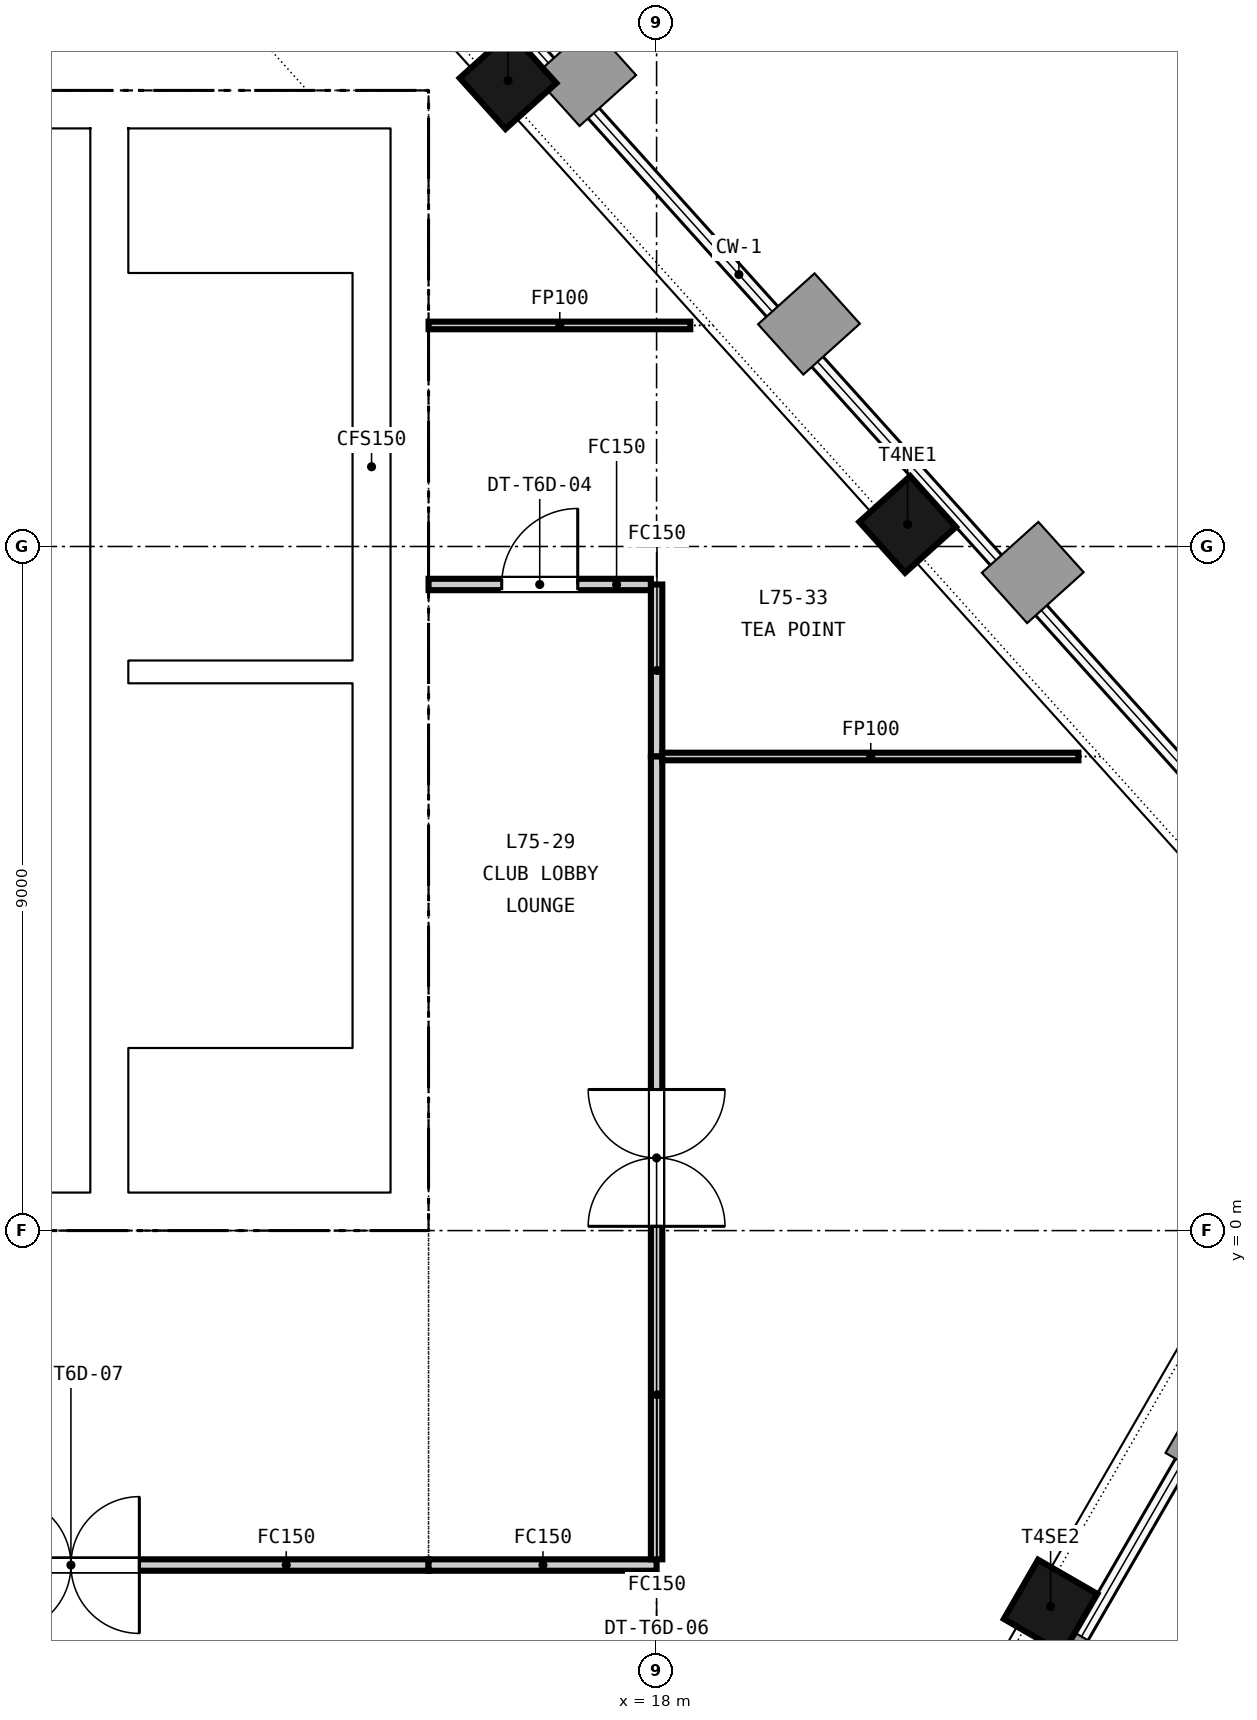
"""IFC4 building model, lengths in metres.
Left out: names, types, materials, properties, quantities, classifications, styles, units other than length and angle.
Written with IfcOpenShell. Run it as: python <this file> out.ifc"""

import sys

from ifc_helpers import new_model, si_unit, direction, frame, frame_2d, origin, origin_2d, place, context, subcontext, project, spatial, rectangle, extrude, element, fill, save


model = new_model("IFC4")
c1 = context("Model", 3, precision=1e-05, world=origin(), true_north=direction((0.0, 1.0)))
c2 = subcontext(c1, "Body", "Model", "MODEL_VIEW")
j1 = project(units=[si_unit("LENGTHUNIT", "METRE"), si_unit("PLANEANGLEUNIT", "RADIAN")], contexts=[c1])
p1 = place(None, origin())
s1 = spatial("IfcSite", under=j1, at=p1, CompositionType="ELEMENT")
p2 = place(p1, origin())
s2 = spatial("IfcBuilding", under=s1, at=p2, CompositionType="ELEMENT")
p3 = place(p2, frame((0.0, 0.0, 293.8)))
s3 = spatial("IfcBuildingStorey", under=s2, at=p3, CompositionType="ELEMENT", Elevation=293.8)
p4 = place(p3, frame((-15.0, 0.25, -0.15), z_axis=(0.0, 0.0, 1.0), x_axis=(1.0, 0.0, 0.0)))
e1 = element("IfcWall", 1, at=p4, inside=s3, PredefinedType="SOLIDWALL", context=c2, shape_type="SweptSolid", body=[
    extrude(rectangle(XDim=30.0, YDim=0.5, at=frame_2d((15.0, 0.0))), origin(), (0.0, 0.0, 1.0), 3.65),
])
p5 = place(p4, frame((5.8, 0.0, 0.15)))
e2 = element("IfcOpeningElement", 2, at=p5, cuts=e1, PredefinedType="OPENING", context=c2, shape_type="SweptSolid", body=[
    extrude(rectangle(XDim=2.4, YDim=2.4, at=frame_2d((1.2, 1.2))), frame((0.0, 0.26, 0.0), z_axis=(0.0, -1.0, 0.0), x_axis=(1.0, 0.0, 0.0)), (0.0, 0.0, 1.0), 0.52),
])
p6 = place(p4, frame((13.8, 0.0, 0.15)))
e3 = element("IfcOpeningElement", 3, at=p6, cuts=e1, PredefinedType="OPENING", context=c2, shape_type="SweptSolid", body=[
    extrude(rectangle(XDim=2.4, YDim=2.4, at=frame_2d((1.2, 1.2))), frame((0.0, 0.26, 0.0), z_axis=(0.0, -1.0, 0.0), x_axis=(1.0, 0.0, 0.0)), (0.0, 0.0, 1.0), 0.52),
])
p7 = place(p4, frame((21.8, 0.0, 0.15)))
e4 = element("IfcOpeningElement", 4, at=p7, cuts=e1, PredefinedType="OPENING", context=c2, shape_type="SweptSolid", body=[
    extrude(rectangle(XDim=2.4, YDim=2.4, at=frame_2d((1.2, 1.2))), frame((0.0, 0.26, 0.0), z_axis=(0.0, -1.0, 0.0), x_axis=(1.0, 0.0, 0.0)), (0.0, 0.0, 1.0), 0.52),
])
p8 = place(p4, frame((1.5, 0.0, 0.15)))
e5 = element("IfcOpeningElement", 5, at=p8, cuts=e1, PredefinedType="OPENING", context=c2, shape_type="SweptSolid", body=[
    extrude(rectangle(XDim=1.2, YDim=2.1, at=frame_2d((0.6, 1.05))), frame((0.0, 0.26, 0.0), z_axis=(0.0, -1.0, 0.0), x_axis=(1.0, 0.0, 0.0)), (0.0, 0.0, 1.0), 0.52),
])
p9 = place(p4, frame((27.3, 0.0, 0.15)))
e6 = element("IfcOpeningElement", 6, at=p9, cuts=e1, PredefinedType="OPENING", context=c2, shape_type="SweptSolid", body=[
    extrude(rectangle(XDim=1.2, YDim=2.1, at=frame_2d((0.6, 1.05))), frame((0.0, 0.26, 0.0), z_axis=(0.0, -1.0, 0.0), x_axis=(1.0, 0.0, 0.0)), (0.0, 0.0, 1.0), 0.52),
])
p10 = place(p3, frame((-15.0, 14.75, -0.15), z_axis=(0.0, 0.0, 1.0), x_axis=(1.0, 0.0, 0.0)))
e7 = element("IfcWall", 7, at=p10, inside=s3, PredefinedType="SOLIDWALL", context=c2, shape_type="SweptSolid", body=[
    extrude(rectangle(XDim=30.0, YDim=0.5, at=frame_2d((15.0, 0.0))), origin(), (0.0, 0.0, 1.0), 3.65),
])
p11 = place(p10, frame((9.25, 0.0, 0.15)))
e8 = element("IfcOpeningElement", 8, at=p11, cuts=e7, PredefinedType="OPENING", context=c2, shape_type="SweptSolid", body=[
    extrude(rectangle(XDim=1.5, YDim=2.1, at=frame_2d((0.75, 1.05))), frame((0.0, 0.26, 0.0), z_axis=(0.0, -1.0, 0.0), x_axis=(1.0, 0.0, 0.0)), (0.0, 0.0, 1.0), 0.52),
])
p12 = place(p10, frame((19.4, 0.0, 0.15)))
e9 = element("IfcOpeningElement", 9, at=p12, cuts=e7, PredefinedType="OPENING", context=c2, shape_type="SweptSolid", body=[
    extrude(rectangle(XDim=1.5, YDim=2.1, at=frame_2d((0.75, 1.05))), frame((0.0, 0.26, 0.0), z_axis=(0.0, -1.0, 0.0), x_axis=(1.0, 0.0, 0.0)), (0.0, 0.0, 1.0), 0.52),
])
p13 = place(p10, frame((1.5, 0.0, 0.15)))
e10 = element("IfcOpeningElement", 10, at=p13, cuts=e7, PredefinedType="OPENING", context=c2, shape_type="SweptSolid", body=[
    extrude(rectangle(XDim=1.2, YDim=2.1, at=frame_2d((0.6, 1.05))), frame((0.0, 0.26, 0.0), z_axis=(0.0, -1.0, 0.0), x_axis=(1.0, 0.0, 0.0)), (0.0, 0.0, 1.0), 0.52),
])
p14 = place(p10, frame((27.3, 0.0, 0.15)))
e11 = element("IfcOpeningElement", 11, at=p14, cuts=e7, PredefinedType="OPENING", context=c2, shape_type="SweptSolid", body=[
    extrude(rectangle(XDim=1.2, YDim=2.1, at=frame_2d((0.6, 1.05))), frame((0.0, 0.26, 0.0), z_axis=(0.0, -1.0, 0.0), x_axis=(1.0, 0.0, 0.0)), (0.0, 0.0, 1.0), 0.52),
])
for number, where, z_axis, x_axis in (
    (12, (14.75, 0.5, -0.15), (0.0, 0.0, 1.0), (0.0, 1.0, 0.0)),
    (13, (10.8, 0.5, -0.15), (0.0, 0.0, 1.0), (0.0, 1.0, 0.0)),
):
    element("IfcWall", number, at=place(p3, frame(where, z_axis=z_axis, x_axis=x_axis)), inside=s3, PredefinedType="SOLIDWALL", context=c2, shape_type="SweptSolid", body=[
        extrude(rectangle(XDim=14.0, YDim=0.5, at=frame_2d((7.0, 0.0))), origin(), (0.0, 0.0, 1.0), 3.65),
    ])
for number, where, z_axis, x_axis in (
    (14, (23.184, -4.945, -0.15), (0.0, 0.0, 1.0), (0.5, 0.866, 0.0)),
    (15, (21.303, 9.29, -0.15), (0.0, 0.0, 1.0), (-0.669, 0.743, 0.0)),
    (16, (16.045, 15.129, -0.15), (0.0, 0.0, 1.0), (-0.669, 0.743, 0.0)),
):
    element("IfcColumn", number, at=place(p3, frame(where, z_axis=z_axis, x_axis=x_axis)), inside=s3, PredefinedType="COLUMN", context=c2, shape_type="SweptSolid", body=[
        extrude(rectangle(XDim=0.9, YDim=0.9, at=origin_2d()), origin(), (0.0, 0.0, 1.0), 3.65),
    ])
p15 = place(p3, frame((-10.55, 3.5, 0.0), z_axis=(0.0, 0.0, 1.0), x_axis=(1.0, 0.0, 0.0)))
e17 = element("IfcWall", 17, at=p15, inside=s3, PredefinedType="PARTITIONING", context=c2, shape_type="SweptSolid", body=[
    extrude(rectangle(XDim=21.1, YDim=0.2, at=frame_2d((10.55, 0.0))), origin(), (0.0, 0.0, 1.0), 3.5),
])
p16 = place(p15, frame((0.675, 0.0, 0.0)))
e18 = element("IfcOpeningElement", 18, at=p16, cuts=e17, PredefinedType="OPENING", context=c2, shape_type="SweptSolid", body=[
    extrude(rectangle(XDim=1.2, YDim=2.1, at=frame_2d((0.6, 1.05))), frame((0.0, 0.11, 0.0), z_axis=(0.0, -1.0, 0.0), x_axis=(1.0, 0.0, 0.0)), (0.0, 0.0, 1.0), 0.22),
])
p17 = place(p15, frame((3.475, 0.0, 0.0)))
e19 = element("IfcOpeningElement", 19, at=p17, cuts=e17, PredefinedType="OPENING", context=c2, shape_type="SweptSolid", body=[
    extrude(rectangle(XDim=1.2, YDim=2.1, at=frame_2d((0.6, 1.05))), frame((0.0, 0.11, 0.0), z_axis=(0.0, -1.0, 0.0), x_axis=(1.0, 0.0, 0.0)), (0.0, 0.0, 1.0), 0.22),
])
p18 = place(p15, frame((6.275, 0.0, 0.0)))
e20 = element("IfcOpeningElement", 20, at=p18, cuts=e17, PredefinedType="OPENING", context=c2, shape_type="SweptSolid", body=[
    extrude(rectangle(XDim=1.2, YDim=2.1, at=frame_2d((0.6, 1.05))), frame((0.0, 0.11, 0.0), z_axis=(0.0, -1.0, 0.0), x_axis=(1.0, 0.0, 0.0)), (0.0, 0.0, 1.0), 0.22),
])
p19 = place(p15, frame((9.075, 0.0, 0.0)))
e21 = element("IfcOpeningElement", 21, at=p19, cuts=e17, PredefinedType="OPENING", context=c2, shape_type="SweptSolid", body=[
    extrude(rectangle(XDim=1.2, YDim=2.1, at=frame_2d((0.6, 1.05))), frame((0.0, 0.11, 0.0), z_axis=(0.0, -1.0, 0.0), x_axis=(1.0, 0.0, 0.0)), (0.0, 0.0, 1.0), 0.22),
])
p20 = place(p15, frame((11.875, 0.0, 0.0)))
e22 = element("IfcOpeningElement", 22, at=p20, cuts=e17, PredefinedType="OPENING", context=c2, shape_type="SweptSolid", body=[
    extrude(rectangle(XDim=1.2, YDim=2.1, at=frame_2d((0.6, 1.05))), frame((0.0, 0.11, 0.0), z_axis=(0.0, -1.0, 0.0), x_axis=(1.0, 0.0, 0.0)), (0.0, 0.0, 1.0), 0.22),
])
p21 = place(p15, frame((14.675, 0.0, 0.0)))
e23 = element("IfcOpeningElement", 23, at=p21, cuts=e17, PredefinedType="OPENING", context=c2, shape_type="SweptSolid", body=[
    extrude(rectangle(XDim=1.2, YDim=2.1, at=frame_2d((0.6, 1.05))), frame((0.0, 0.11, 0.0), z_axis=(0.0, -1.0, 0.0), x_axis=(1.0, 0.0, 0.0)), (0.0, 0.0, 1.0), 0.22),
])
p22 = place(p15, frame((17.475, 0.0, 0.0)))
e24 = element("IfcOpeningElement", 24, at=p22, cuts=e17, PredefinedType="OPENING", context=c2, shape_type="SweptSolid", body=[
    extrude(rectangle(XDim=1.2, YDim=2.1, at=frame_2d((0.6, 1.05))), frame((0.0, 0.11, 0.0), z_axis=(0.0, -1.0, 0.0), x_axis=(1.0, 0.0, 0.0)), (0.0, 0.0, 1.0), 0.22),
])
p23 = place(p15, frame((19.9, 0.0, 0.0)))
e25 = element("IfcOpeningElement", 25, at=p23, cuts=e17, PredefinedType="OPENING", context=c2, shape_type="SweptSolid", body=[
    extrude(rectangle(XDim=0.9, YDim=2.1, at=frame_2d((0.45, 1.05))), frame((0.0, 0.11, 0.0), z_axis=(0.0, -1.0, 0.0), x_axis=(1.0, 0.0, 0.0)), (0.0, 0.0, 1.0), 0.22),
])
p24 = place(p3, frame((-10.55, 6.025, 0.0), z_axis=(0.0, 0.0, 1.0), x_axis=(1.0, 0.0, 0.0)))
e26 = element("IfcWall", 26, at=p24, inside=s3, PredefinedType="PARTITIONING", context=c2, shape_type="SweptSolid", body=[
    extrude(rectangle(XDim=21.1, YDim=0.25, at=frame_2d((10.55, 0.0))), origin(), (0.0, 0.0, 1.0), 3.5),
])
p25 = place(p3, frame((-4.125, 8.55, 0.0), z_axis=(0.0, 0.0, 1.0), x_axis=(1.0, 0.0, 0.0)))
e27 = element("IfcWall", 27, at=p25, inside=s3, PredefinedType="PARTITIONING", context=c2, shape_type="SweptSolid", body=[
    extrude(rectangle(XDim=14.675, YDim=0.2, at=frame_2d((7.337, 0.0))), origin(), (0.0, 0.0, 1.0), 3.5),
])
p26 = place(p25, frame((2.438, 0.0, 0.0)))
e28 = element("IfcOpeningElement", 28, at=p26, cuts=e27, PredefinedType="OPENING", context=c2, shape_type="SweptSolid", body=[
    extrude(rectangle(XDim=1.0, YDim=2.1, at=frame_2d((0.5, 1.05))), frame((0.0, 0.11, 0.0), z_axis=(0.0, -1.0, 0.0), x_axis=(1.0, 0.0, 0.0)), (0.0, 0.0, 1.0), 0.22),
])
p27 = place(p25, frame((6.775, 0.0, 0.0)))
e29 = element("IfcOpeningElement", 29, at=p27, cuts=e27, PredefinedType="OPENING", context=c2, shape_type="SweptSolid", body=[
    extrude(rectangle(XDim=1.0, YDim=2.1, at=frame_2d((0.5, 1.05))), frame((0.0, 0.11, 0.0), z_axis=(0.0, -1.0, 0.0), x_axis=(1.0, 0.0, 0.0)), (0.0, 0.0, 1.0), 0.22),
])
p28 = place(p25, frame((10.363, 0.0, 0.0)))
e30 = element("IfcOpeningElement", 30, at=p28, cuts=e27, PredefinedType="OPENING", context=c2, shape_type="SweptSolid", body=[
    extrude(rectangle(XDim=1.0, YDim=2.1, at=frame_2d((0.5, 1.05))), frame((0.0, 0.11, 0.0), z_axis=(0.0, -1.0, 0.0), x_axis=(1.0, 0.0, 0.0)), (0.0, 0.0, 1.0), 0.22),
])
p29 = place(p25, frame((13.475, 0.0, 0.0)))
e31 = element("IfcOpeningElement", 31, at=p29, cuts=e27, PredefinedType="OPENING", context=c2, shape_type="SweptSolid", body=[
    extrude(rectangle(XDim=0.9, YDim=2.1, at=frame_2d((0.45, 1.05))), frame((0.0, 0.11, 0.0), z_axis=(0.0, -1.0, 0.0), x_axis=(1.0, 0.0, 0.0)), (0.0, 0.0, 1.0), 0.22),
])
p30 = place(p3, frame((5.9, 11.2, 0.0), z_axis=(0.0, 0.0, 1.0), x_axis=(1.0, 0.0, 0.0)))
e32 = element("IfcWall", 32, at=p30, inside=s3, PredefinedType="PARTITIONING", context=c2, shape_type="SweptSolid", body=[
    extrude(rectangle(XDim=4.65, YDim=0.2, at=frame_2d((2.325, 0.0))), origin(), (0.0, 0.0, 1.0), 3.5),
])
p31 = place(p30, frame((1.075, 0.0, 0.0)))
e33 = element("IfcOpeningElement", 33, at=p31, cuts=e32, PredefinedType="OPENING", context=c2, shape_type="SweptSolid", body=[
    extrude(rectangle(XDim=0.9, YDim=2.1, at=frame_2d((0.45, 1.05))), frame((0.0, 0.11, 0.0), z_axis=(0.0, -1.0, 0.0), x_axis=(1.0, 0.0, 0.0)), (0.0, 0.0, 1.0), 0.22),
])
p32 = place(p30, frame((3.4, 0.0, 0.0)))
e34 = element("IfcOpeningElement", 34, at=p32, cuts=e32, PredefinedType="OPENING", context=c2, shape_type="SweptSolid", body=[
    extrude(rectangle(XDim=0.9, YDim=2.1, at=frame_2d((0.45, 1.05))), frame((0.0, 0.11, 0.0), z_axis=(0.0, -1.0, 0.0), x_axis=(1.0, 0.0, 0.0)), (0.0, 0.0, 1.0), 0.22),
])
p33 = place(p3, frame((11.05, 7.35, 0.0), z_axis=(0.0, 0.0, 1.0), x_axis=(1.0, 0.0, 0.0)))
e35 = element("IfcWall", 35, at=p33, inside=s3, PredefinedType="SOLIDWALL", context=c2, shape_type="SweptSolid", body=[
    extrude(rectangle(XDim=2.95, YDim=0.3, at=frame_2d((1.475, 0.0))), origin(), (0.0, 0.0, 1.0), 3.5),
])
p34 = place(p3, frame((14.25, 0.5, 0.0), z_axis=(0.0, 0.0, 1.0), x_axis=(0.0, 1.0, 0.0)))
e36 = element("IfcWall", 36, at=p34, inside=s3, PredefinedType="SOLIDWALL", context=c2, shape_type="SweptSolid", body=[
    extrude(rectangle(XDim=14.0, YDim=0.5, at=frame_2d((7.0, 0.0))), origin(), (0.0, 0.0, 1.0), 3.5),
])
p35 = place(p3, frame((15.0, -4.4, 0.0), z_axis=(0.0, 0.0, 1.0), x_axis=(-1.0, 0.0, 0.0)))
e37 = element("IfcWall", 37, at=p35, inside=s3, PredefinedType="PARTITIONING", context=c2, shape_type="SweptSolid", body=[
    extrude(rectangle(XDim=9.41, YDim=0.15, at=frame_2d((4.705, 0.0))), origin(), (0.0, 0.0, 1.0), 2.751),
])
p36 = place(p35, frame((3.805, 0.0, 0.0)))
e38 = element("IfcOpeningElement", 38, at=p36, cuts=e37, PredefinedType="OPENING", context=c2, shape_type="SweptSolid", body=[
    extrude(rectangle(XDim=1.8, YDim=2.1, at=frame_2d((0.9, 1.05))), frame((0.0, 0.085, 0.0), z_axis=(0.0, -1.0, 0.0), x_axis=(1.0, 0.0, 0.0)), (0.0, 0.0, 1.0), 0.17),
])
p37 = place(p3, frame((18.0, 8.5, 0.0), z_axis=(0.0, 0.0, 1.0), x_axis=(0.0, -1.0, 0.0)))
e39 = element("IfcWall", 39, at=p37, inside=s3, PredefinedType="PARTITIONING", context=c2, shape_type="SweptSolid", body=[
    extrude(rectangle(XDim=2.263, YDim=0.15, at=frame_2d((1.131, 0.0))), origin(), (0.0, 0.0, 1.0), 2.751),
])
p38 = place(p3, frame((18.0, -4.4, 0.0), z_axis=(0.0, 0.0, 1.0), x_axis=(-1.0, 0.0, 0.0)))
e40 = element("IfcWall", 40, at=p38, inside=s3, PredefinedType="PARTITIONING", context=c2, shape_type="SweptSolid", body=[
    extrude(rectangle(XDim=3.0, YDim=0.15, at=frame_2d((1.5, 0.0))), origin(), (0.0, 0.0, 1.0), 2.751),
])
p39 = place(p3, frame((18.0, 6.237, 0.0), z_axis=(0.0, 0.0, 1.0), x_axis=(0.0, -1.0, 0.0)))
e41 = element("IfcWall", 41, at=p39, inside=s3, PredefinedType="PARTITIONING", context=c2, shape_type="SweptSolid", body=[
    extrude(rectangle(XDim=10.562, YDim=0.15, at=frame_2d((5.281, 0.0))), origin(), (0.0, 0.0, 1.0), 2.751),
])
p40 = place(p39, frame((4.381, 0.0, 0.0)))
e42 = element("IfcOpeningElement", 42, at=p40, cuts=e41, PredefinedType="OPENING", context=c2, shape_type="SweptSolid", body=[
    extrude(rectangle(XDim=1.8, YDim=2.1, at=frame_2d((0.9, 1.05))), frame((0.0, 0.085, 0.0), z_axis=(0.0, -1.0, 0.0), x_axis=(1.0, 0.0, 0.0)), (0.0, 0.0, 1.0), 0.17),
])
p41 = place(p3, frame((15.0, 11.908, 0.0), z_axis=(0.0, 0.0, 1.0), x_axis=(1.0, 0.0, 0.0)))
e43 = element("IfcWall", 43, at=p41, inside=s3, PredefinedType="PARTITIONING", context=c2, shape_type="SweptSolid", body=[
    extrude(rectangle(XDim=3.443, YDim=0.1, at=frame_2d((1.722, 0.0))), origin(), (0.0, 0.0, 1.0), 2.751),
])
p42 = place(p3, frame((15.0, 8.5, 0.0), z_axis=(0.0, 0.0, 1.0), x_axis=(1.0, 0.0, 0.0)))
e44 = element("IfcWall", 44, at=p42, inside=s3, PredefinedType="PARTITIONING", context=c2, shape_type="SweptSolid", body=[
    extrude(rectangle(XDim=2.925, YDim=0.15, at=frame_2d((1.462, 0.0))), origin(), (0.0, 0.0, 1.0), 2.751),
])
p43 = place(p42, frame((0.962, 0.0, 0.0)))
e45 = element("IfcOpeningElement", 45, at=p43, cuts=e44, PredefinedType="OPENING", context=c2, shape_type="SweptSolid", body=[
    extrude(rectangle(XDim=1.0, YDim=2.1, at=frame_2d((0.5, 1.05))), frame((0.0, 0.085, 0.0), z_axis=(0.0, -1.0, 0.0), x_axis=(1.0, 0.0, 0.0)), (0.0, 0.0, 1.0), 0.17),
])
p44 = place(p3, frame((18.075, 6.237, 0.0), z_axis=(0.0, 0.0, 1.0), x_axis=(1.0, 0.0, 0.0)))
e46 = element("IfcWall", 46, at=p44, inside=s3, PredefinedType="PARTITIONING", context=c2, shape_type="SweptSolid", body=[
    extrude(rectangle(XDim=5.475, YDim=0.1, at=frame_2d((2.738, 0.0))), origin(), (0.0, 0.0, 1.0), 2.751),
])
p45 = place(p23, origin())
e47 = element("IfcDoor", 47, at=p45, inside=s3, OperationType="SINGLE_SWING_RIGHT", PredefinedType="DOOR", context=c2, shape_type="SweptSolid", body=[
    extrude(rectangle(XDim=0.9, YDim=2.1, at=frame_2d((0.45, 1.05))), frame((0.0, 0.025, 0.0), z_axis=(0.0, -1.0, 0.0), x_axis=(1.0, 0.0, 0.0)), (0.0, 0.0, 1.0), 0.05),
])
fill(e25, e47)
p46 = place(p29, origin())
e48 = element("IfcDoor", 48, at=p46, inside=s3, OperationType="SINGLE_SWING_RIGHT", PredefinedType="DOOR", context=c2, shape_type="SweptSolid", body=[
    extrude(rectangle(XDim=0.9, YDim=2.1, at=frame_2d((0.45, 1.05))), frame((0.0, 0.025, 0.0), z_axis=(0.0, -1.0, 0.0), x_axis=(1.0, 0.0, 0.0)), (0.0, 0.0, 1.0), 0.05),
])
fill(e31, e48)
p47 = place(p32, origin())
e49 = element("IfcDoor", 49, at=p47, inside=s3, OperationType="SINGLE_SWING_LEFT", PredefinedType="DOOR", context=c2, shape_type="SweptSolid", body=[
    extrude(rectangle(XDim=0.9, YDim=2.1, at=frame_2d((0.45, 1.05))), frame((0.0, 0.025, 0.0), z_axis=(0.0, -1.0, 0.0), x_axis=(1.0, 0.0, 0.0)), (0.0, 0.0, 1.0), 0.05),
])
fill(e34, e49)
p48 = place(p14, origin())
e50 = element("IfcDoor", 50, at=p48, inside=s3, OperationType="SINGLE_SWING_LEFT", PredefinedType="DOOR", context=c2, shape_type="SweptSolid", body=[
    extrude(rectangle(XDim=1.2, YDim=2.1, at=frame_2d((0.6, 1.05))), frame((0.0, 0.025, 0.0), z_axis=(0.0, -1.0, 0.0), x_axis=(1.0, 0.0, 0.0)), (0.0, 0.0, 1.0), 0.05),
])
fill(e11, e50)
p49 = place(p9, origin())
e51 = element("IfcDoor", 51, at=p49, inside=s3, OperationType="SINGLE_SWING_RIGHT", PredefinedType="DOOR", context=c2, shape_type="SweptSolid", body=[
    extrude(rectangle(XDim=1.2, YDim=2.1, at=frame_2d((0.6, 1.05))), frame((0.0, 0.025, 0.0), z_axis=(0.0, -1.0, 0.0), x_axis=(1.0, 0.0, 0.0)), (0.0, 0.0, 1.0), 0.05),
])
fill(e6, e51)
p50 = place(p43, origin())
e52 = element("IfcDoor", 52, at=p50, inside=s3, OperationType="SINGLE_SWING_RIGHT", PredefinedType="DOOR", context=c2, shape_type="SweptSolid", body=[
    extrude(rectangle(XDim=1.0, YDim=2.1, at=frame_2d((0.5, 1.05))), frame((0.0, 0.025, 0.0), z_axis=(0.0, -1.0, 0.0), x_axis=(1.0, 0.0, 0.0)), (0.0, 0.0, 1.0), 0.05),
])
fill(e45, e52)
p51 = place(p40, origin())
e53 = element("IfcDoor", 53, at=p51, inside=s3, OperationType="DOUBLE_DOOR_DOUBLE_SWING", PredefinedType="DOOR", context=c2, shape_type="SweptSolid", body=[
    extrude(rectangle(XDim=1.8, YDim=2.1, at=frame_2d((0.9, 1.05))), frame((0.0, 0.025, 0.0), z_axis=(0.0, -1.0, 0.0), x_axis=(1.0, 0.0, 0.0)), (0.0, 0.0, 1.0), 0.05),
])
fill(e42, e53)
p52 = place(p36, origin())
e54 = element("IfcDoor", 54, at=p52, inside=s3, OperationType="DOUBLE_DOOR_DOUBLE_SWING", PredefinedType="DOOR", context=c2, shape_type="SweptSolid", body=[
    extrude(rectangle(XDim=1.8, YDim=2.1, at=frame_2d((0.9, 1.05))), frame((0.0, 0.025, 0.0), z_axis=(0.0, -1.0, 0.0), x_axis=(1.0, 0.0, 0.0)), (0.0, 0.0, 1.0), 0.05),
])
fill(e38, e54)
save(model, sys.argv[1])
